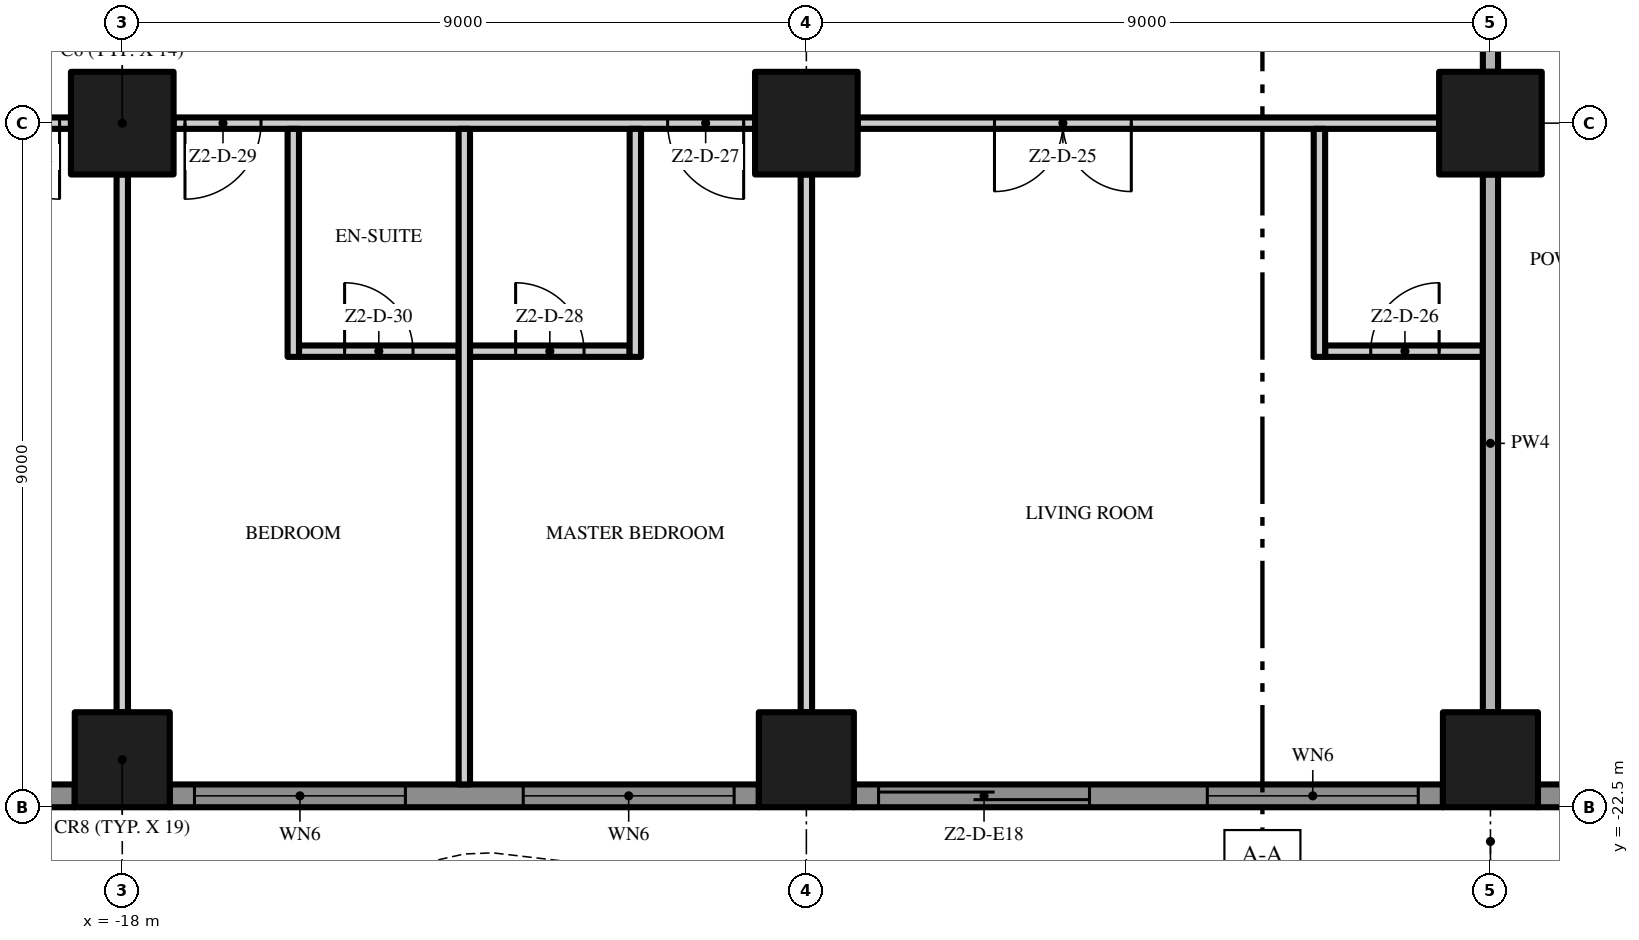
"""IFC4 building model, lengths in metres.
Left out: names, types, materials, properties, quantities, classifications, styles, units other than length and angle.
Written with IfcOpenShell. Run it as: python <this file> out.ifc"""

import sys

from ifc_helpers import new_model, si_unit, direction, frame, frame_2d, origin, origin_2d, place, context, subcontext, project, spatial, polyline, rectangle, outline, extrude, element, fill, save


model = new_model("IFC4")
c1 = context("Model", 3, precision=1e-05, world=origin(), true_north=direction((0.0, 1.0)))
c2 = subcontext(c1, "Body", "Model", "MODEL_VIEW")
j1 = project(units=[si_unit("LENGTHUNIT", "METRE"), si_unit("PLANEANGLEUNIT", "RADIAN")], contexts=[c1])
p1 = place(None, origin())
s1 = spatial("IfcSite", under=j1, at=p1, CompositionType="ELEMENT")
p2 = place(p1, origin())
s2 = spatial("IfcBuilding", under=s1, at=p2, CompositionType="ELEMENT")
p3 = place(p2, frame((0.0, 0.0, 111.2)))
s3 = spatial("IfcBuildingStorey", under=s2, at=p3, CompositionType="ELEMENT", Elevation=111.2)
p4 = place(p3, frame((-18.0, -13.5, 0.0), z_axis=(0.0, 0.0, 1.0), x_axis=(1.0, 0.0, 0.0)))
e1 = element("IfcColumn", 1, at=p4, inside=s3, PredefinedType="COLUMN", context=c2, shape_type="SweptSolid", body=[
    extrude(rectangle(XDim=1.35, YDim=1.35, at=origin_2d()), origin(), (0.0, 0.0, 1.0), 3.5),
])
p5 = place(p3, frame((-18.0, -21.875, 0.0), z_axis=(0.0, 0.0, 1.0), x_axis=(1.0, 0.0, 0.0)))
e2 = element("IfcColumn", 2, at=p5, inside=s3, PredefinedType="COLUMN", context=c2, shape_type="SweptSolid", body=[
    extrude(rectangle(XDim=1.25, YDim=1.25, at=origin_2d()), origin(), (0.0, 0.0, 1.0), 3.5),
])
p6 = place(p3, frame((-9.0, -13.5, 0.0), z_axis=(0.0, 0.0, 1.0), x_axis=(1.0, 0.0, 0.0)))
e3 = element("IfcColumn", 3, at=p6, inside=s3, PredefinedType="COLUMN", context=c2, shape_type="SweptSolid", body=[
    extrude(rectangle(XDim=1.35, YDim=1.35, at=origin_2d()), origin(), (0.0, 0.0, 1.0), 3.5),
])
p7 = place(p3, frame((-9.0, -21.875, 0.0), z_axis=(0.0, 0.0, 1.0), x_axis=(1.0, 0.0, 0.0)))
e4 = element("IfcColumn", 4, at=p7, inside=s3, PredefinedType="COLUMN", context=c2, shape_type="SweptSolid", body=[
    extrude(rectangle(XDim=1.25, YDim=1.25, at=origin_2d()), origin(), (0.0, 0.0, 1.0), 3.5),
])
p8 = place(p3, frame((0.0, -13.5, 0.0), z_axis=(0.0, 0.0, 1.0), x_axis=(1.0, 0.0, 0.0)))
e5 = element("IfcColumn", 5, at=p8, inside=s3, PredefinedType="COLUMN", context=c2, shape_type="SweptSolid", body=[
    extrude(rectangle(XDim=1.35, YDim=1.35, at=origin_2d()), origin(), (0.0, 0.0, 1.0), 3.5),
])
p9 = place(p3, frame((0.0, -21.875, 0.0), z_axis=(0.0, 0.0, 1.0), x_axis=(1.0, 0.0, 0.0)))
e6 = element("IfcColumn", 6, at=p9, inside=s3, PredefinedType="COLUMN", context=c2, shape_type="SweptSolid", body=[
    extrude(rectangle(XDim=1.25, YDim=1.25, at=origin_2d()), origin(), (0.0, 0.0, 1.0), 3.5),
])
p10 = place(p3, frame((-18.625, -22.35, 0.0), z_axis=(0.0, 0.0, 1.0), x_axis=(-1.0, 0.0, 0.0)))
e7 = element("IfcWall", 7, at=p10, inside=s3, PredefinedType="SOLIDWALL", context=c2, shape_type="SweptSolid", body=[
    extrude(rectangle(XDim=3.575, YDim=0.3, at=frame_2d((1.788, 0.0))), origin(), (0.0, 0.0, 1.0), 3.5),
])
p11 = place(p10, frame((0.325, 0.0, 0.0)))
e8 = element("IfcOpeningElement", 8, at=p11, cuts=e7, PredefinedType="OPENING", context=c2, shape_type="SweptSolid", body=[
    extrude(rectangle(XDim=2.775, YDim=2.4, at=frame_2d((1.387, 1.2))), frame((0.0, 0.16, 0.0), z_axis=(0.0, -1.0, 0.0), x_axis=(1.0, 0.0, 0.0)), (0.0, 0.0, 1.0), 0.32),
])
p12 = place(p3, frame((-9.625, -22.35, 0.0), z_axis=(0.0, 0.0, 1.0), x_axis=(-1.0, 0.0, 0.0)))
e9 = element("IfcWall", 9, at=p12, inside=s3, PredefinedType="SOLIDWALL", context=c2, shape_type="SweptSolid", body=[
    extrude(rectangle(XDim=7.75, YDim=0.3, at=frame_2d((3.875, 0.0))), origin(), (0.0, 0.0, 1.0), 3.5),
])
p13 = place(p12, frame((4.65, 0.0, 0.45)))
e10 = element("IfcOpeningElement", 10, at=p13, cuts=e9, PredefinedType="OPENING", context=c2, shape_type="SweptSolid", body=[
    extrude(rectangle(XDim=2.775, YDim=2.65, at=frame_2d((1.387, 1.325))), frame((0.0, 0.16, 0.0), z_axis=(0.0, -1.0, 0.0), x_axis=(1.0, 0.0, 0.0)), (0.0, 0.0, 1.0), 0.32),
])
p14 = place(p12, frame((0.325, 0.0, 0.45)))
e11 = element("IfcOpeningElement", 11, at=p14, cuts=e9, PredefinedType="OPENING", context=c2, shape_type="SweptSolid", body=[
    extrude(rectangle(XDim=2.775, YDim=2.65, at=frame_2d((1.387, 1.325))), frame((0.0, 0.16, 0.0), z_axis=(0.0, -1.0, 0.0), x_axis=(1.0, 0.0, 0.0)), (0.0, 0.0, 1.0), 0.32),
])
p15 = place(p3, frame((-0.625, -22.35, 0.0), z_axis=(0.0, 0.0, 1.0), x_axis=(-1.0, 0.0, 0.0)))
e12 = element("IfcWall", 12, at=p15, inside=s3, PredefinedType="SOLIDWALL", context=c2, shape_type="SweptSolid", body=[
    extrude(rectangle(XDim=7.75, YDim=0.3, at=frame_2d((3.875, 0.0))), origin(), (0.0, 0.0, 1.0), 3.5),
])
p16 = place(p15, frame((4.65, 0.0, 0.0)))
e13 = element("IfcOpeningElement", 13, at=p16, cuts=e12, PredefinedType="OPENING", context=c2, shape_type="SweptSolid", body=[
    extrude(rectangle(XDim=2.775, YDim=2.4, at=frame_2d((1.387, 1.2))), frame((0.0, 0.16, 0.0), z_axis=(0.0, -1.0, 0.0), x_axis=(1.0, 0.0, 0.0)), (0.0, 0.0, 1.0), 0.32),
])
p17 = place(p15, frame((0.325, 0.0, 0.45)))
e14 = element("IfcOpeningElement", 14, at=p17, cuts=e12, PredefinedType="OPENING", context=c2, shape_type="SweptSolid", body=[
    extrude(rectangle(XDim=2.775, YDim=2.65, at=frame_2d((1.387, 1.325))), frame((0.0, 0.16, 0.0), z_axis=(0.0, -1.0, 0.0), x_axis=(1.0, 0.0, 0.0)), (0.0, 0.0, 1.0), 0.32),
])
p18 = place(p3, frame((8.375, -22.35, 0.0), z_axis=(0.0, 0.0, 1.0), x_axis=(-1.0, 0.0, 0.0)))
e15 = element("IfcWall", 15, at=p18, inside=s3, PredefinedType="SOLIDWALL", context=c2, shape_type="SweptSolid", body=[
    extrude(rectangle(XDim=7.75, YDim=0.3, at=frame_2d((3.875, 0.0))), origin(), (0.0, 0.0, 1.0), 3.5),
])
p19 = place(p18, frame((4.65, 0.0, 0.45)))
e16 = element("IfcOpeningElement", 16, at=p19, cuts=e15, PredefinedType="OPENING", context=c2, shape_type="SweptSolid", body=[
    extrude(rectangle(XDim=2.775, YDim=2.65, at=frame_2d((1.387, 1.325))), frame((0.0, 0.16, 0.0), z_axis=(0.0, -1.0, 0.0), x_axis=(1.0, 0.0, 0.0)), (0.0, 0.0, 1.0), 0.32),
])
p20 = place(p18, frame((0.325, 0.0, 0.0)))
e17 = element("IfcOpeningElement", 17, at=p20, cuts=e15, PredefinedType="OPENING", context=c2, shape_type="SweptSolid", body=[
    extrude(rectangle(XDim=2.775, YDim=2.4, at=frame_2d((1.387, 1.2))), frame((0.0, 0.16, 0.0), z_axis=(0.0, -1.0, 0.0), x_axis=(1.0, 0.0, 0.0)), (0.0, 0.0, 1.0), 0.32),
])
p21 = place(p3, origin())
e18 = element("IfcWall", 18, at=p21, inside=s3, PredefinedType="USERDEFINED", context=c2, shape_type="SweptSolid", body=[
    extrude(outline(polyline([(-22.5, -25.149), (-21.0, -25.485), (-20.625, -25.5), (-19.5, -25.369), (-18.0, -24.845), (-16.5, -24.112), (-15.0, -23.451), (-13.5, -23.115), (-13.125, -23.1), (-12.0, -23.231), (-10.5, -23.755), (-9.0, -24.488), (-7.5, -25.149), (-6.0, -25.485), (-5.625, -25.5), (-4.5, -25.369), (-3.0, -24.845), (-1.5, -24.112), (0.0, -23.451), (1.5, -23.115), (1.875, -23.1), (3.0, -23.231), (4.5, -23.755), (6.0, -24.488), (7.5, -25.149), (9.0, -25.485), (9.375, -25.5), (10.5, -25.369), (12.0, -24.845), (13.5, -24.112), (15.0, -23.451), (16.5, -23.115), (16.875, -23.1), (18.0, -23.231), (19.5, -23.755), (21.0, -24.488), (22.5, -25.149), (22.601, -24.92), (21.105, -24.261), (19.596, -23.524), (18.056, -22.986), (16.885, -22.849), (16.467, -22.866), (14.921, -23.213), (13.395, -23.885), (11.904, -24.614), (10.444, -25.124), (9.365, -25.249), (9.033, -25.236), (7.579, -24.91), (6.105, -24.261), (4.596, -23.524), (3.056, -22.986), (1.885, -22.849), (1.467, -22.866), (-0.079, -23.213), (-1.605, -23.885), (-3.096, -24.614), (-4.556, -25.124), (-5.635, -25.249), (-5.967, -25.236), (-7.421, -24.91), (-8.895, -24.261), (-10.404, -23.524), (-11.944, -22.986), (-13.115, -22.849), (-13.533, -22.866), (-15.079, -23.213), (-16.605, -23.885), (-18.096, -24.614), (-19.556, -25.124), (-20.635, -25.249), (-20.967, -25.236), (-22.445, -24.905), (-22.5, -25.149)])), origin(), (0.0, 0.0, 1.0), 0.9),
])
p22 = place(p3, frame((-15.675, -16.5, 0.0), z_axis=(0.0, 0.0, 1.0), x_axis=(1.0, 0.0, 0.0)))
e19 = element("IfcWall", 19, at=p22, inside=s3, PredefinedType="PARTITIONING", context=c2, shape_type="SweptSolid", body=[
    extrude(rectangle(XDim=2.1, YDim=0.15, at=frame_2d((1.05, 0.0))), origin(), (0.0, 0.0, 1.0), 3.5),
])
p23 = place(p22, frame((0.6, 0.0, 0.0)))
e20 = element("IfcOpeningElement", 20, at=p23, cuts=e19, PredefinedType="OPENING", context=c2, shape_type="SweptSolid", body=[
    extrude(rectangle(XDim=0.9, YDim=2.1, at=frame_2d((0.45, 1.05))), frame((0.0, 0.085, 0.0), z_axis=(0.0, -1.0, 0.0), x_axis=(1.0, 0.0, 0.0)), (0.0, 0.0, 1.0), 0.17),
])
p24 = place(p3, frame((-13.425, -16.5, 0.0), z_axis=(0.0, 0.0, 1.0), x_axis=(1.0, 0.0, 0.0)))
e21 = element("IfcWall", 21, at=p24, inside=s3, PredefinedType="PARTITIONING", context=c2, shape_type="SweptSolid", body=[
    extrude(rectangle(XDim=2.1, YDim=0.15, at=frame_2d((1.05, 0.0))), origin(), (0.0, 0.0, 1.0), 3.5),
])
p25 = place(p24, frame((0.6, 0.0, 0.0)))
e22 = element("IfcOpeningElement", 22, at=p25, cuts=e21, PredefinedType="OPENING", context=c2, shape_type="SweptSolid", body=[
    extrude(rectangle(XDim=0.9, YDim=2.1, at=frame_2d((0.45, 1.05))), frame((0.0, 0.085, 0.0), z_axis=(0.0, -1.0, 0.0), x_axis=(1.0, 0.0, 0.0)), (0.0, 0.0, 1.0), 0.17),
])
p26 = place(p3, frame((-2.175, -16.5, 0.0), z_axis=(0.0, 0.0, 1.0), x_axis=(1.0, 0.0, 0.0)))
e23 = element("IfcWall", 23, at=p26, inside=s3, PredefinedType="PARTITIONING", context=c2, shape_type="SweptSolid", body=[
    extrude(rectangle(XDim=2.075, YDim=0.15, at=frame_2d((1.038, 0.0))), origin(), (0.0, 0.0, 1.0), 3.5),
])
p27 = place(p26, frame((0.6, 0.0, 0.0)))
e24 = element("IfcOpeningElement", 24, at=p27, cuts=e23, PredefinedType="OPENING", context=c2, shape_type="SweptSolid", body=[
    extrude(rectangle(XDim=0.9, YDim=2.1, at=frame_2d((0.45, 1.05))), frame((0.0, 0.085, 0.0), z_axis=(0.0, -1.0, 0.0), x_axis=(1.0, 0.0, 0.0)), (0.0, 0.0, 1.0), 0.17),
])
p28 = place(p3, frame((-18.675, -13.5, 0.0), z_axis=(0.0, 0.0, 1.0), x_axis=(-1.0, 0.0, 0.0)))
e25 = element("IfcWall", 25, at=p28, inside=s3, PredefinedType="PARTITIONING", context=c2, shape_type="SweptSolid", body=[
    extrude(rectangle(XDim=7.075, YDim=0.15, at=frame_2d((3.538, 0.0))), origin(), (0.0, 0.0, 1.0), 3.5),
])
p29 = place(p28, frame((0.15, 0.0, 0.0)))
e26 = element("IfcOpeningElement", 26, at=p29, cuts=e25, PredefinedType="OPENING", context=c2, shape_type="SweptSolid", body=[
    extrude(rectangle(XDim=1.0, YDim=2.4, at=frame_2d((0.5, 1.2))), frame((0.0, 0.085, 0.0), z_axis=(0.0, -1.0, 0.0), x_axis=(1.0, 0.0, 0.0)), (0.0, 0.0, 1.0), 0.17),
])
p30 = place(p28, frame((5.325, 0.0, 0.0)))
e27 = element("IfcOpeningElement", 27, at=p30, cuts=e25, PredefinedType="OPENING", context=c2, shape_type="SweptSolid", body=[
    extrude(rectangle(XDim=1.5, YDim=2.4, at=frame_2d((0.75, 1.2))), frame((0.0, 0.085, 0.0), z_axis=(0.0, -1.0, 0.0), x_axis=(1.0, 0.0, 0.0)), (0.0, 0.0, 1.0), 0.17),
])
p31 = place(p3, frame((-9.675, -13.5, 0.0), z_axis=(0.0, 0.0, 1.0), x_axis=(-1.0, 0.0, 0.0)))
e28 = element("IfcWall", 28, at=p31, inside=s3, PredefinedType="PARTITIONING", context=c2, shape_type="SweptSolid", body=[
    extrude(rectangle(XDim=7.65, YDim=0.15, at=frame_2d((3.825, 0.0))), origin(), (0.0, 0.0, 1.0), 3.5),
])
p32 = place(p31, frame((0.15, 0.0, 0.0)))
e29 = element("IfcOpeningElement", 29, at=p32, cuts=e28, PredefinedType="OPENING", context=c2, shape_type="SweptSolid", body=[
    extrude(rectangle(XDim=1.0, YDim=2.4, at=frame_2d((0.5, 1.2))), frame((0.0, 0.085, 0.0), z_axis=(0.0, -1.0, 0.0), x_axis=(1.0, 0.0, 0.0)), (0.0, 0.0, 1.0), 0.17),
])
p33 = place(p31, frame((6.5, 0.0, 0.0)))
e30 = element("IfcOpeningElement", 30, at=p33, cuts=e28, PredefinedType="OPENING", context=c2, shape_type="SweptSolid", body=[
    extrude(rectangle(XDim=1.0, YDim=2.4, at=frame_2d((0.5, 1.2))), frame((0.0, 0.085, 0.0), z_axis=(0.0, -1.0, 0.0), x_axis=(1.0, 0.0, 0.0)), (0.0, 0.0, 1.0), 0.17),
])
p34 = place(p3, frame((-0.675, -13.5, 0.0), z_axis=(0.0, 0.0, 1.0), x_axis=(-1.0, 0.0, 0.0)))
e31 = element("IfcWall", 31, at=p34, inside=s3, PredefinedType="PARTITIONING", context=c2, shape_type="SweptSolid", body=[
    extrude(rectangle(XDim=7.65, YDim=0.15, at=frame_2d((3.825, 0.0))), origin(), (0.0, 0.0, 1.0), 3.5),
])
p35 = place(p34, frame((4.05, 0.0, 0.0)))
e32 = element("IfcOpeningElement", 32, at=p35, cuts=e31, PredefinedType="OPENING", context=c2, shape_type="SweptSolid", body=[
    extrude(rectangle(XDim=1.8, YDim=2.4, at=frame_2d((0.9, 1.2))), frame((0.0, 0.085, 0.0), z_axis=(0.0, -1.0, 0.0), x_axis=(1.0, 0.0, 0.0)), (0.0, 0.0, 1.0), 0.17),
])
p36 = place(p3, frame((-18.0, -21.25, 0.0), z_axis=(0.0, 0.0, 1.0), x_axis=(0.0, 1.0, 0.0)))
e33 = element("IfcWall", 33, at=p36, inside=s3, PredefinedType="PARTITIONING", context=c2, shape_type="SweptSolid", body=[
    extrude(rectangle(XDim=7.075, YDim=0.15, at=frame_2d((3.538, 0.0))), origin(), (0.0, 0.0, 1.0), 3.5),
])
p37 = place(p3, frame((-15.75, -16.575, 0.0), z_axis=(0.0, 0.0, 1.0), x_axis=(0.0, 1.0, 0.0)))
e34 = element("IfcWall", 34, at=p37, inside=s3, PredefinedType="PARTITIONING", context=c2, shape_type="SweptSolid", body=[
    extrude(rectangle(XDim=3.0, YDim=0.15, at=frame_2d((1.5, 0.0))), origin(), (0.0, 0.0, 1.0), 3.5),
])
p38 = place(p3, frame((-13.5, -22.2, 0.0), z_axis=(0.0, 0.0, 1.0), x_axis=(0.0, 1.0, 0.0)))
e35 = element("IfcWall", 35, at=p38, inside=s3, PredefinedType="PARTITIONING", context=c2, shape_type="SweptSolid", body=[
    extrude(rectangle(XDim=8.625, YDim=0.15, at=frame_2d((4.312, 0.0))), origin(), (0.0, 0.0, 1.0), 3.5),
])
p39 = place(p3, frame((-11.25, -16.575, 0.0), z_axis=(0.0, 0.0, 1.0), x_axis=(0.0, 1.0, 0.0)))
e36 = element("IfcWall", 36, at=p39, inside=s3, PredefinedType="PARTITIONING", context=c2, shape_type="SweptSolid", body=[
    extrude(rectangle(XDim=3.0, YDim=0.15, at=frame_2d((1.5, 0.0))), origin(), (0.0, 0.0, 1.0), 3.5),
])
p40 = place(p3, frame((-9.0, -21.25, 0.0), z_axis=(0.0, 0.0, 1.0), x_axis=(0.0, 1.0, 0.0)))
e37 = element("IfcWall", 37, at=p40, inside=s3, PredefinedType="PARTITIONING", context=c2, shape_type="SweptSolid", body=[
    extrude(rectangle(XDim=7.075, YDim=0.15, at=frame_2d((3.538, 0.0))), origin(), (0.0, 0.0, 1.0), 3.5),
])
p41 = place(p3, frame((-2.25, -16.575, 0.0), z_axis=(0.0, 0.0, 1.0), x_axis=(0.0, 1.0, 0.0)))
e38 = element("IfcWall", 38, at=p41, inside=s3, PredefinedType="PARTITIONING", context=c2, shape_type="SweptSolid", body=[
    extrude(rectangle(XDim=3.0, YDim=0.15, at=frame_2d((1.5, 0.0))), origin(), (0.0, 0.0, 1.0), 3.5),
])
p42 = place(p3, frame((0.0, -21.25, 0.0), z_axis=(0.0, 0.0, 1.0), x_axis=(0.0, 1.0, 0.0)))
e39 = element("IfcWall", 39, at=p42, inside=s3, PredefinedType="PARTITIONING", context=c2, shape_type="SweptSolid", body=[
    extrude(rectangle(XDim=7.075, YDim=0.2, at=frame_2d((3.538, 0.0))), origin(), (0.0, 0.0, 1.0), 3.5),
])
p43 = place(p3, frame((0.0, -12.825, 0.0), z_axis=(0.0, 0.0, 1.0), x_axis=(0.0, 1.0, 0.0)))
e40 = element("IfcWall", 40, at=p43, inside=s3, PredefinedType="PARTITIONING", context=c2, shape_type="SweptSolid", body=[
    extrude(rectangle(XDim=7.65, YDim=0.2, at=frame_2d((3.825, 0.0))), origin(), (0.0, 0.0, 1.0), 3.5),
])
p44 = place(p13, origin())
e41 = element("IfcWindow", 41, at=p44, inside=s3, PartitioningType="SINGLE_PANEL", PredefinedType="WINDOW", context=c2, shape_type="SweptSolid", body=[
    extrude(rectangle(XDim=2.775, YDim=2.65, at=frame_2d((1.387, 1.325))), frame((0.0, 0.03, 0.0), z_axis=(0.0, -1.0, 0.0), x_axis=(1.0, 0.0, 0.0)), (0.0, 0.0, 1.0), 0.06),
])
fill(e10, e41)
p45 = place(p14, origin())
e42 = element("IfcWindow", 42, at=p45, inside=s3, PartitioningType="SINGLE_PANEL", PredefinedType="WINDOW", context=c2, shape_type="SweptSolid", body=[
    extrude(rectangle(XDim=2.775, YDim=2.65, at=frame_2d((1.387, 1.325))), frame((0.0, 0.03, 0.0), z_axis=(0.0, -1.0, 0.0), x_axis=(1.0, 0.0, 0.0)), (0.0, 0.0, 1.0), 0.06),
])
fill(e11, e42)
p46 = place(p16, origin())
e43 = element("IfcDoor", 43, at=p46, inside=s3, OperationType="SINGLE_SWING_LEFT", PredefinedType="DOOR", context=c2, shape_type="SweptSolid", body=[
    extrude(rectangle(XDim=2.775, YDim=2.4, at=frame_2d((1.387, 1.2))), frame((0.0, 0.025, 0.0), z_axis=(0.0, -1.0, 0.0), x_axis=(1.0, 0.0, 0.0)), (0.0, 0.0, 1.0), 0.05),
])
fill(e13, e43)
p47 = place(p17, origin())
e44 = element("IfcWindow", 44, at=p47, inside=s3, PartitioningType="SINGLE_PANEL", PredefinedType="WINDOW", context=c2, shape_type="SweptSolid", body=[
    extrude(rectangle(XDim=2.775, YDim=2.65, at=frame_2d((1.387, 1.325))), frame((0.0, 0.03, 0.0), z_axis=(0.0, -1.0, 0.0), x_axis=(1.0, 0.0, 0.0)), (0.0, 0.0, 1.0), 0.06),
])
fill(e14, e44)
p48 = place(p35, origin())
e45 = element("IfcDoor", 45, at=p48, inside=s3, OperationType="DOUBLE_DOOR_SINGLE_SWING", PredefinedType="DOOR", context=c2, shape_type="SweptSolid", body=[
    extrude(rectangle(XDim=1.8, YDim=2.4, at=frame_2d((0.9, 1.2))), frame((0.0, 0.025, 0.0), z_axis=(0.0, -1.0, 0.0), x_axis=(1.0, 0.0, 0.0)), (0.0, 0.0, 1.0), 0.05),
])
fill(e32, e45)
p49 = place(p27, origin())
e46 = element("IfcDoor", 46, at=p49, inside=s3, OperationType="SINGLE_SWING_RIGHT", PredefinedType="DOOR", context=c2, shape_type="SweptSolid", body=[
    extrude(rectangle(XDim=0.9, YDim=2.1, at=frame_2d((0.45, 1.05))), frame((0.0, 0.025, 0.0), z_axis=(0.0, -1.0, 0.0), x_axis=(1.0, 0.0, 0.0)), (0.0, 0.0, 1.0), 0.05),
])
fill(e24, e46)
p50 = place(p32, origin())
e47 = element("IfcDoor", 47, at=p50, inside=s3, OperationType="SINGLE_SWING_LEFT", PredefinedType="DOOR", context=c2, shape_type="SweptSolid", body=[
    extrude(rectangle(XDim=1.0, YDim=2.4, at=frame_2d((0.5, 1.2))), frame((0.0, 0.025, 0.0), z_axis=(0.0, -1.0, 0.0), x_axis=(1.0, 0.0, 0.0)), (0.0, 0.0, 1.0), 0.05),
])
fill(e29, e47)
p51 = place(p25, origin())
e48 = element("IfcDoor", 48, at=p51, inside=s3, OperationType="SINGLE_SWING_LEFT", PredefinedType="DOOR", context=c2, shape_type="SweptSolid", body=[
    extrude(rectangle(XDim=0.9, YDim=2.1, at=frame_2d((0.45, 1.05))), frame((0.0, 0.025, 0.0), z_axis=(0.0, -1.0, 0.0), x_axis=(1.0, 0.0, 0.0)), (0.0, 0.0, 1.0), 0.05),
])
fill(e22, e48)
p52 = place(p33, origin())
e49 = element("IfcDoor", 49, at=p52, inside=s3, OperationType="SINGLE_SWING_RIGHT", PredefinedType="DOOR", context=c2, shape_type="SweptSolid", body=[
    extrude(rectangle(XDim=1.0, YDim=2.4, at=frame_2d((0.5, 1.2))), frame((0.0, 0.025, 0.0), z_axis=(0.0, -1.0, 0.0), x_axis=(1.0, 0.0, 0.0)), (0.0, 0.0, 1.0), 0.05),
])
fill(e30, e49)
p53 = place(p23, origin())
e50 = element("IfcDoor", 50, at=p53, inside=s3, OperationType="SINGLE_SWING_LEFT", PredefinedType="DOOR", context=c2, shape_type="SweptSolid", body=[
    extrude(rectangle(XDim=0.9, YDim=2.1, at=frame_2d((0.45, 1.05))), frame((0.0, 0.025, 0.0), z_axis=(0.0, -1.0, 0.0), x_axis=(1.0, 0.0, 0.0)), (0.0, 0.0, 1.0), 0.05),
])
fill(e20, e50)
p54 = place(p29, origin())
e51 = element("IfcDoor", 51, at=p54, inside=s3, OperationType="SINGLE_SWING_LEFT", PredefinedType="DOOR", context=c2, shape_type="SweptSolid", body=[
    extrude(rectangle(XDim=1.0, YDim=2.4, at=frame_2d((0.5, 1.2))), frame((0.0, 0.025, 0.0), z_axis=(0.0, -1.0, 0.0), x_axis=(1.0, 0.0, 0.0)), (0.0, 0.0, 1.0), 0.05),
])
fill(e26, e51)
save(model, sys.argv[1])
